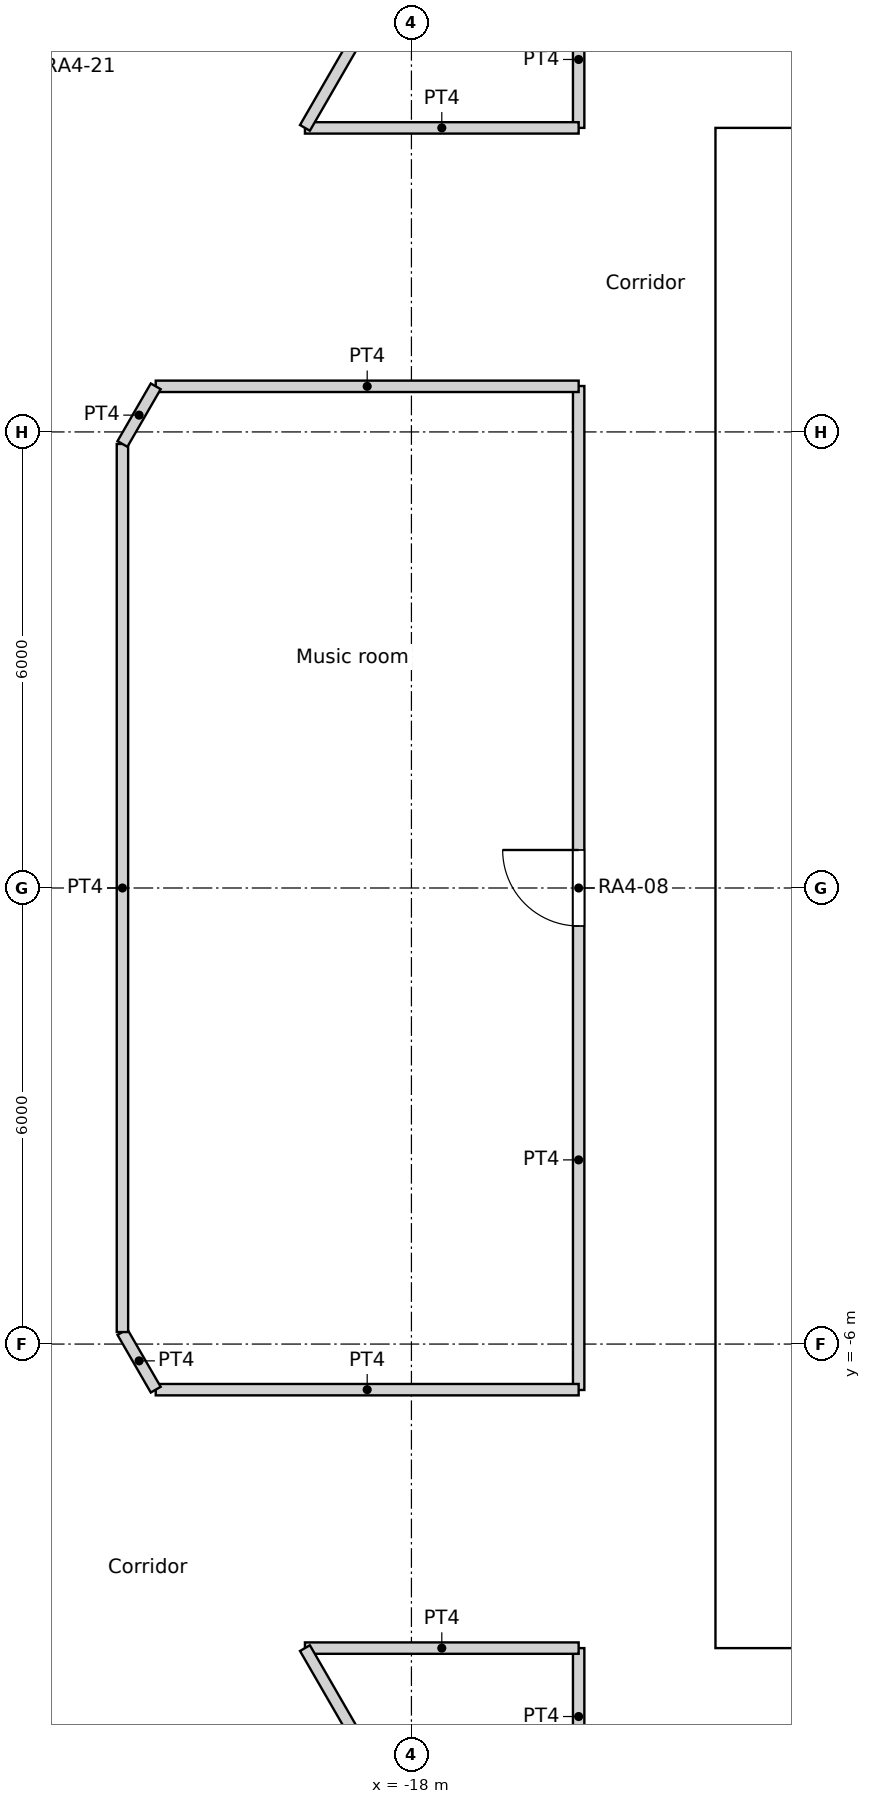
"""IFC4 building model, lengths in metres.
Left out: names, types, materials, properties, quantities, classifications, styles, units other than length and angle.
Written with IfcOpenShell. Run it as: python <this file> out.ifc"""

import sys

from ifc_helpers import new_model, si_unit, direction, frame, frame_2d, origin, origin_2d, place, context, subcontext, project, spatial, rectangle, circle, extrude, element, fill, save


model = new_model("IFC4")
c1 = context("Model", 3, precision=1e-05, world=origin(), true_north=direction((0.0, 1.0)))
c2 = subcontext(c1, "Body", "Model", "MODEL_VIEW")
j1 = project(units=[si_unit("LENGTHUNIT", "METRE"), si_unit("PLANEANGLEUNIT", "RADIAN")], contexts=[c1])
p1 = place(None, origin())
s1 = spatial("IfcSite", under=j1, at=p1, CompositionType="ELEMENT")
p2 = place(p1, origin())
s2 = spatial("IfcBuilding", under=s1, at=p2, CompositionType="ELEMENT")
p3 = place(p2, frame((0.0, 0.0, 60.6)))
s3 = spatial("IfcBuildingStorey", under=s2, at=p3, CompositionType="ELEMENT", Elevation=60.6)
for number, where, z_axis, x_axis in (
    (1, (-23.067, 8.396, 0.0), (0.0, 0.0, 1.0), (1.0, 0.0, 0.0)),
    (2, (-23.067, -8.396, 0.0), (0.0, 0.0, 1.0), (1.0, 0.0, 0.0)),
):
    element("IfcColumn", number, at=place(p3, frame(where, z_axis=z_axis, x_axis=x_axis)), inside=s3, PredefinedType="COLUMN", context=c2, shape_type="SweptSolid", body=[
        extrude(circle(Radius=0.75, at=origin_2d()), origin(), (0.0, 0.0, 1.0), 3.6),
    ])
for number, where, z_axis, x_axis in (
    (3, (-16.958, 8.167, 0.0), (0.0, 0.0, 1.0), (1.0, 0.0, 0.0)),
    (4, (-18.612, 2.805, 0.0), (0.0, 0.0, 1.0), (1.0, 0.0, 0.0)),
    (5, (-18.612, -2.805, 0.0), (0.0, 0.0, 1.0), (1.0, 0.0, 0.0)),
    (6, (-16.958, -8.167, 0.0), (0.0, 0.0, 1.0), (1.0, 0.0, 0.0)),
):
    element("IfcColumn", number, at=place(p3, frame(where, z_axis=z_axis, x_axis=x_axis)), inside=s3, PredefinedType="COLUMN", context=c2, shape_type="SweptSolid", body=[
        extrude(circle(Radius=0.8, at=origin_2d()), origin(), (0.0, 0.0, 1.0), 3.6),
    ])
p4 = place(p3, frame((-14.0, -9.4, 0.0), z_axis=(0.0, 0.0, 1.0), x_axis=(1.0, 0.0, 0.0)))
e7 = element("IfcWall", 7, at=p4, inside=s3, PredefinedType="SOLIDWALL", context=c2, shape_type="SweptSolid", body=[
    extrude(rectangle(XDim=28.0, YDim=1.2, at=frame_2d((14.0, 0.0))), origin(), (0.0, 0.0, 1.0), 3.6),
])
p5 = place(p4, frame((14.9, 0.0, 0.0)))
e8 = element("IfcOpeningElement", 8, at=p5, cuts=e7, PredefinedType="OPENING", context=c2, shape_type="SweptSolid", body=[
    extrude(rectangle(XDim=1.0, YDim=2.1, at=frame_2d((0.5, 1.05))), frame((0.0, 0.6, 0.0), z_axis=(0.0, -1.0, 0.0), x_axis=(1.0, 0.0, 0.0)), (0.0, 0.0, 1.0), 1.2),
])
p6 = place(p4, frame((9.8, 0.0, 0.0)))
e9 = element("IfcOpeningElement", 9, at=p6, cuts=e7, PredefinedType="OPENING", context=c2, shape_type="SweptSolid", body=[
    extrude(rectangle(XDim=1.8, YDim=2.1, at=frame_2d((0.9, 1.05))), frame((0.0, 0.6, 0.0), z_axis=(0.0, -1.0, 0.0), x_axis=(1.0, 0.0, 0.0)), (0.0, 0.0, 1.0), 1.2),
])
p7 = place(p4, frame((16.4, 0.0, 0.0)))
e10 = element("IfcOpeningElement", 10, at=p7, cuts=e7, PredefinedType="OPENING", context=c2, shape_type="SweptSolid", body=[
    extrude(rectangle(XDim=1.8, YDim=2.1, at=frame_2d((0.9, 1.05))), frame((0.0, 0.6, 0.0), z_axis=(0.0, -1.0, 0.0), x_axis=(1.0, 0.0, 0.0)), (0.0, 0.0, 1.0), 1.2),
])
p8 = place(p3, frame((-14.0, 9.4, 0.0), z_axis=(0.0, 0.0, 1.0), x_axis=(1.0, 0.0, 0.0)))
e11 = element("IfcWall", 11, at=p8, inside=s3, PredefinedType="SOLIDWALL", context=c2, shape_type="SweptSolid", body=[
    extrude(rectangle(XDim=28.0, YDim=1.2, at=frame_2d((14.0, 0.0))), origin(), (0.0, 0.0, 1.0), 3.6),
])
p9 = place(p8, frame((9.8, 0.0, 0.0)))
e12 = element("IfcOpeningElement", 12, at=p9, cuts=e11, PredefinedType="OPENING", context=c2, shape_type="SweptSolid", body=[
    extrude(rectangle(XDim=1.8, YDim=2.1, at=frame_2d((0.9, 1.05))), frame((0.0, 0.6, 0.0), z_axis=(0.0, -1.0, 0.0), x_axis=(1.0, 0.0, 0.0)), (0.0, 0.0, 1.0), 1.2),
])
p10 = place(p3, frame((-13.4, -8.8, 0.0), z_axis=(0.0, 0.0, 1.0), x_axis=(0.0, 1.0, 0.0)))
e13 = element("IfcWall", 13, at=p10, inside=s3, PredefinedType="SOLIDWALL", context=c2, shape_type="SweptSolid", body=[
    extrude(rectangle(XDim=17.6, YDim=1.2, at=frame_2d((8.8, 0.0))), origin(), (0.0, 0.0, 1.0), 3.6),
])
p11 = place(p10, frame((5.2, 0.0, 0.0)))
e14 = element("IfcOpeningElement", 14, at=p11, cuts=e13, PredefinedType="OPENING", context=c2, shape_type="SweptSolid", body=[
    extrude(rectangle(XDim=1.0, YDim=2.1, at=frame_2d((0.5, 1.05))), frame((0.0, 0.6, 0.0), z_axis=(0.0, -1.0, 0.0), x_axis=(1.0, 0.0, 0.0)), (0.0, 0.0, 1.0), 1.2),
])
p12 = place(p10, frame((11.4, 0.0, 0.0)))
e15 = element("IfcOpeningElement", 15, at=p12, cuts=e13, PredefinedType="OPENING", context=c2, shape_type="SweptSolid", body=[
    extrude(rectangle(XDim=1.0, YDim=2.1, at=frame_2d((0.5, 1.05))), frame((0.0, 0.6, 0.0), z_axis=(0.0, -1.0, 0.0), x_axis=(1.0, 0.0, 0.0)), (0.0, 0.0, 1.0), 1.2),
])
for number, where, z_axis, x_axis in (
    (16, (-15.8, 10.0, 0.0), (0.0, 0.0, 1.0), (0.0, 1.0, 0.0)),
    (17, (-15.8, -11.8, 0.0), (0.0, 0.0, 1.0), (0.0, 1.0, 0.0)),
):
    element("IfcWall", number, at=place(p3, frame(where, z_axis=z_axis, x_axis=x_axis)), inside=s3, PredefinedType="PARTITIONING", context=c2, shape_type="SweptSolid", body=[
        extrude(rectangle(XDim=1.8, YDim=0.15, at=frame_2d((0.9, 0.0))), origin(), (0.0, 0.0, 1.0), 3.15),
    ])
p13 = place(p3, frame((-15.8, -6.604, 0.0), z_axis=(0.0, 0.0, 1.0), x_axis=(0.0, 1.0, 0.0)))
e18 = element("IfcWall", 18, at=p13, inside=s3, PredefinedType="PARTITIONING", context=c2, shape_type="SweptSolid", body=[
    extrude(rectangle(XDim=13.208, YDim=0.15, at=frame_2d((6.604, 0.0))), origin(), (0.0, 0.0, 1.0), 3.15),
])
p14 = place(p13, frame((6.104, 0.0, 0.0)))
e19 = element("IfcOpeningElement", 19, at=p14, cuts=e18, PredefinedType="OPENING", context=c2, shape_type="SweptSolid", body=[
    extrude(rectangle(XDim=1.0, YDim=2.04, at=frame_2d((0.5, 1.02))), frame((0.0, 0.075, 0.0), z_axis=(0.0, -1.0, 0.0), x_axis=(1.0, 0.0, 0.0)), (0.0, 0.0, 1.0), 0.15),
])
p15 = place(p3, frame((-25.255, 7.416, 0.0), z_axis=(0.0, 0.0, 1.0), x_axis=(0.540805851332, 0.841147449123, 0.0)))
e20 = element("IfcWall", 20, at=p15, inside=s3, PredefinedType="PARTITIONING", context=c2, shape_type="SweptSolid", body=[
    extrude(rectangle(XDim=14.829, YDim=0.15, at=frame_2d((7.415, 0.0))), origin(), (0.0, 0.0, 1.0), 3.15),
])
p16 = place(p15, frame((10.307, 0.0, 0.0)))
e21 = element("IfcOpeningElement", 21, at=p16, cuts=e20, PredefinedType="OPENING", context=c2, shape_type="SweptSolid", body=[
    extrude(rectangle(XDim=1.0, YDim=2.1, at=frame_2d((0.5, 1.05))), frame((0.0, 0.075, 0.0), z_axis=(0.0, -1.0, 0.0), x_axis=(1.0, 0.0, 0.0)), (0.0, 0.0, 1.0), 0.15),
])
p17 = place(p15, frame((3.522, 0.0, 0.0)))
e22 = element("IfcOpeningElement", 22, at=p17, cuts=e20, PredefinedType="OPENING", context=c2, shape_type="SweptSolid", body=[
    extrude(rectangle(XDim=1.0, YDim=2.1, at=frame_2d((0.5, 1.05))), frame((0.0, 0.075, 0.0), z_axis=(0.0, -1.0, 0.0), x_axis=(1.0, 0.0, 0.0)), (0.0, 0.0, 1.0), 0.15),
])
p18 = place(p3, frame((-21.364, 6.6, 0.0), z_axis=(0.0, 0.0, 1.0), x_axis=(1.0, 0.0, 0.0)))
e23 = element("IfcWall", 23, at=p18, inside=s3, PredefinedType="PARTITIONING", context=c2, shape_type="SweptSolid", body=[
    extrude(rectangle(XDim=5.564, YDim=0.15, at=frame_2d((2.782, 0.0))), origin(), (0.0, 0.0, 1.0), 3.15),
])
p19 = place(p3, frame((-21.802, 5.842, 0.0), z_axis=(0.0, 0.0, 1.0), x_axis=(0.500277597875, 0.865865073245, 0.0)))
e24 = element("IfcWall", 24, at=p19, inside=s3, PredefinedType="PARTITIONING", context=c2, shape_type="SweptSolid", body=[
    extrude(rectangle(XDim=0.875, YDim=0.15, at=frame_2d((0.438, 0.0))), origin(), (0.0, 0.0, 1.0), 3.15),
])
p20 = place(p3, frame((-21.802, -5.842, 0.0), z_axis=(0.0, 0.0, 1.0), x_axis=(0.0, 1.0, 0.0)))
e25 = element("IfcWall", 25, at=p20, inside=s3, PredefinedType="PARTITIONING", context=c2, shape_type="SweptSolid", body=[
    extrude(rectangle(XDim=11.684, YDim=0.15, at=frame_2d((5.842, 0.0))), origin(), (0.0, 0.0, 1.0), 3.15),
])
p21 = place(p3, frame((-21.802, -5.842, 0.0), z_axis=(0.0, 0.0, 1.0), x_axis=(0.500277597875, -0.865865073245, 0.0)))
e26 = element("IfcWall", 26, at=p21, inside=s3, PredefinedType="PARTITIONING", context=c2, shape_type="SweptSolid", body=[
    extrude(rectangle(XDim=0.875, YDim=0.15, at=frame_2d((0.438, 0.0))), origin(), (0.0, 0.0, 1.0), 3.15),
])
p22 = place(p3, frame((-21.364, -6.6, 0.0), z_axis=(0.0, 0.0, 1.0), x_axis=(1.0, 0.0, 0.0)))
e27 = element("IfcWall", 27, at=p22, inside=s3, PredefinedType="PARTITIONING", context=c2, shape_type="SweptSolid", body=[
    extrude(rectangle(XDim=5.564, YDim=0.15, at=frame_2d((2.782, 0.0))), origin(), (0.0, 0.0, 1.0), 3.15),
])
p23 = place(p3, frame((-19.401, 10.0, 0.0), z_axis=(0.0, 0.0, 1.0), x_axis=(0.499992689227, 0.86602962462, 0.0)))
e28 = element("IfcWall", 28, at=p23, inside=s3, PredefinedType="PARTITIONING", context=c2, shape_type="SweptSolid", body=[
    extrude(rectangle(XDim=6.882, YDim=0.15, at=frame_2d((3.441, 0.0))), origin(), (0.0, 0.0, 1.0), 3.15),
])
p24 = place(p23, frame((2.941, 0.0, 0.0)))
e29 = element("IfcOpeningElement", 29, at=p24, cuts=e28, PredefinedType="OPENING", context=c2, shape_type="SweptSolid", body=[
    extrude(rectangle(XDim=1.0, YDim=2.04, at=frame_2d((0.5, 1.02))), frame((0.0, 0.075, 0.0), z_axis=(0.0, -1.0, 0.0), x_axis=(1.0, 0.0, 0.0)), (0.0, 0.0, 1.0), 0.15),
])
for number, where, z_axis, x_axis in (
    (30, (-19.401, 10.0, 0.0), (0.0, 0.0, 1.0), (1.0, 0.0, 0.0)),
    (31, (-19.401, -10.0, 0.0), (0.0, 0.0, 1.0), (1.0, 0.0, 0.0)),
):
    element("IfcWall", number, at=place(p3, frame(where, z_axis=z_axis, x_axis=x_axis)), inside=s3, PredefinedType="PARTITIONING", context=c2, shape_type="SweptSolid", body=[
        extrude(rectangle(XDim=3.601, YDim=0.15, at=frame_2d((1.8, 0.0))), origin(), (0.0, 0.0, 1.0), 3.15),
    ])
p25 = place(p3, frame((-19.401, -10.0, 0.0), z_axis=(0.0, 0.0, 1.0), x_axis=(0.499992689227, -0.86602962462, 0.0)))
e32 = element("IfcWall", 32, at=p25, inside=s3, PredefinedType="PARTITIONING", context=c2, shape_type="SweptSolid", body=[
    extrude(rectangle(XDim=6.882, YDim=0.15, at=frame_2d((3.441, 0.0))), origin(), (0.0, 0.0, 1.0), 3.15),
])
p26 = place(p25, frame((2.941, 0.0, 0.0)))
e33 = element("IfcOpeningElement", 33, at=p26, cuts=e32, PredefinedType="OPENING", context=c2, shape_type="SweptSolid", body=[
    extrude(rectangle(XDim=1.0, YDim=2.04, at=frame_2d((0.5, 1.02))), frame((0.0, 0.075, 0.0), z_axis=(0.0, -1.0, 0.0), x_axis=(1.0, 0.0, 0.0)), (0.0, 0.0, 1.0), 0.15),
])
p27 = place(p3, frame((-25.253, -7.415, 0.0), z_axis=(0.0, 0.0, 1.0), x_axis=(0.540867421004, -0.841107860442, 0.0)))
e34 = element("IfcWall", 34, at=p27, inside=s3, PredefinedType="PARTITIONING", context=c2, shape_type="SweptSolid", body=[
    extrude(rectangle(XDim=14.829, YDim=0.15, at=frame_2d((7.415, 0.0))), origin(), (0.0, 0.0, 1.0), 3.15),
])
p28 = place(p27, frame((8.926, 0.0, 0.0)))
e35 = element("IfcOpeningElement", 35, at=p28, cuts=e34, PredefinedType="OPENING", context=c2, shape_type="SweptSolid", body=[
    extrude(rectangle(XDim=1.8, YDim=2.1, at=frame_2d((0.9, 1.05))), frame((0.0, 0.075, 0.0), z_axis=(0.0, -1.0, 0.0), x_axis=(1.0, 0.0, 0.0)), (0.0, 0.0, 1.0), 0.15),
])
p29 = place(p11, origin())
e36 = element("IfcDoor", 36, at=p29, inside=s3, OperationType="DOUBLE_DOOR_SINGLE_SWING", PredefinedType="DOOR", context=c2, shape_type="SweptSolid", body=[
    extrude(rectangle(XDim=1.0, YDim=2.1, at=frame_2d((0.5, 1.05))), frame((0.0, 0.025, 0.0), z_axis=(0.0, -1.0, 0.0), x_axis=(1.0, 0.0, 0.0)), (0.0, 0.0, 1.0), 0.05),
])
fill(e14, e36)
p30 = place(p12, origin())
e37 = element("IfcDoor", 37, at=p30, inside=s3, OperationType="DOUBLE_DOOR_SINGLE_SWING", PredefinedType="DOOR", context=c2, shape_type="SweptSolid", body=[
    extrude(rectangle(XDim=1.0, YDim=2.1, at=frame_2d((0.5, 1.05))), frame((0.0, 0.025, 0.0), z_axis=(0.0, -1.0, 0.0), x_axis=(1.0, 0.0, 0.0)), (0.0, 0.0, 1.0), 0.05),
])
fill(e15, e37)
p31 = place(p14, origin())
e38 = element("IfcDoor", 38, at=p31, inside=s3, OperationType="SINGLE_SWING_RIGHT", PredefinedType="DOOR", context=c2, shape_type="SweptSolid", body=[
    extrude(rectangle(XDim=1.0, YDim=2.04, at=frame_2d((0.5, 1.02))), frame((0.0, 0.025, 0.0), z_axis=(0.0, -1.0, 0.0), x_axis=(1.0, 0.0, 0.0)), (0.0, 0.0, 1.0), 0.05),
])
fill(e19, e38)
save(model, sys.argv[1])
